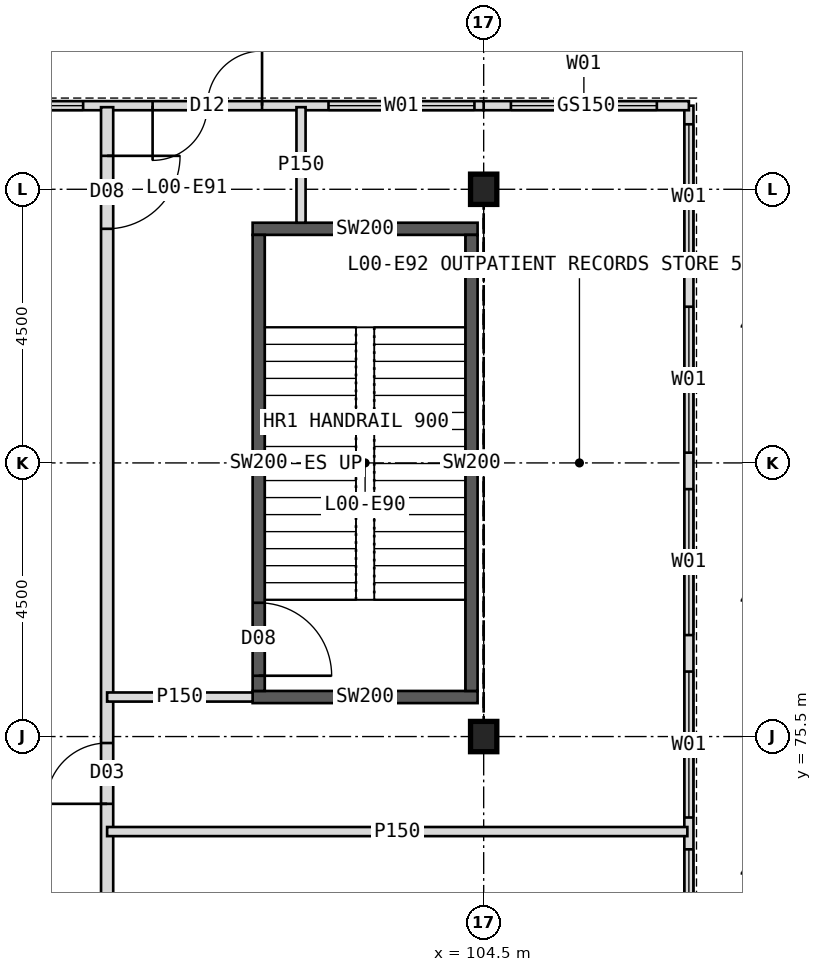
"""IFC4 building model, lengths in metres.
Left out: names, types, materials, properties, quantities, classifications, styles, units other than length and angle.
Written with IfcOpenShell. Run it as: python <this file> out.ifc"""

import sys

from ifc_helpers import new_model, si_unit, direction, frame, frame_2d, origin, origin_2d, place, context, subcontext, project, spatial, rectangle, i_section, extrude, element, fill, save


model = new_model("IFC4")
c1 = context("Model", 3, precision=1e-05, world=origin(), true_north=direction((0.0, 1.0)))
c2 = subcontext(c1, "Body", "Model", "MODEL_VIEW")
j1 = project(units=[si_unit("LENGTHUNIT", "METRE"), si_unit("PLANEANGLEUNIT", "RADIAN")], contexts=[c1])
p1 = place(None, origin())
s1 = spatial("IfcSite", under=j1, at=p1, CompositionType="ELEMENT")
p2 = place(p1, origin())
s2 = spatial("IfcBuilding", under=s1, at=p2, CompositionType="ELEMENT")
p3 = place(p2, origin())
s3 = spatial("IfcBuildingStorey", under=s2, at=p3, CompositionType="ELEMENT", Elevation=0.0)
for number, where, z_axis, x_axis in (
    (1, (104.5, 75.5, 0.0), (0.0, 0.0, 1.0), (1.0, 0.0, 0.0)),
    (2, (104.5, 84.5, 0.0), (0.0, 0.0, 1.0), (1.0, 0.0, 0.0)),
):
    element("IfcColumn", number, at=place(p3, frame(where, z_axis=z_axis, x_axis=x_axis)), inside=s3, PredefinedType="COLUMN", context=c2, shape_type="SweptSolid", body=[
        extrude(i_section(OverallWidth=0.432, OverallDepth=0.498, WebThickness=0.056, FlangeThickness=0.089, FilletRadius=0.015, at=origin_2d()), origin(), (0.0, 0.0, 1.0), 6.0),
    ])
p4 = place(p3, frame((107.875, 38.125, 0.0), z_axis=(0.0, 0.0, 1.0), x_axis=(0.0, 1.0, 0.0)))
e3 = element("IfcWall", 3, at=p4, inside=s3, PredefinedType="STANDARD", context=c2, shape_type="SweptSolid", body=[
    extrude(rectangle(XDim=47.75, YDim=0.15, at=frame_2d((23.875, 0.0))), origin(), (0.0, 0.0, 1.0), 6.0),
])
p5 = place(p4, frame((22.7, 0.0, 0.0)))
e4 = element("IfcOpeningElement", 4, at=p5, cuts=e3, PredefinedType="OPENING", context=c2, shape_type="SweptSolid", body=[
    extrude(rectangle(XDim=2.4, YDim=2.6, at=frame_2d((1.2, 1.3))), frame((0.0, 0.085, 0.0), z_axis=(0.0, -1.0, 0.0), x_axis=(1.0, 0.0, 0.0)), (0.0, 0.0, 1.0), 0.17),
])
p6 = place(p4, frame((0.33, 0.0, 0.6)))
e5 = element("IfcOpeningElement", 5, at=p6, cuts=e3, PredefinedType="OPENING", context=c2, shape_type="SweptSolid", body=[
    extrude(rectangle(XDim=2.4, YDim=3.0, at=frame_2d((1.2, 1.5))), frame((0.0, 0.085, 0.0), z_axis=(0.0, -1.0, 0.0), x_axis=(1.0, 0.0, 0.0)), (0.0, 0.0, 1.0), 0.17),
])
p7 = place(p4, frame((3.277, 0.0, 0.6)))
e6 = element("IfcOpeningElement", 6, at=p7, cuts=e3, PredefinedType="OPENING", context=c2, shape_type="SweptSolid", body=[
    extrude(rectangle(XDim=2.4, YDim=3.0, at=frame_2d((1.2, 1.5))), frame((0.0, 0.085, 0.0), z_axis=(0.0, -1.0, 0.0), x_axis=(1.0, 0.0, 0.0)), (0.0, 0.0, 1.0), 0.17),
])
p8 = place(p4, frame((6.261, 0.0, 0.6)))
e7 = element("IfcOpeningElement", 7, at=p8, cuts=e3, PredefinedType="OPENING", context=c2, shape_type="SweptSolid", body=[
    extrude(rectangle(XDim=2.4, YDim=3.0, at=frame_2d((1.2, 1.5))), frame((0.0, 0.085, 0.0), z_axis=(0.0, -1.0, 0.0), x_axis=(1.0, 0.0, 0.0)), (0.0, 0.0, 1.0), 0.17),
])
p9 = place(p4, frame((9.225, 0.0, 0.6)))
e8 = element("IfcOpeningElement", 8, at=p9, cuts=e3, PredefinedType="OPENING", context=c2, shape_type="SweptSolid", body=[
    extrude(rectangle(XDim=2.4, YDim=3.0, at=frame_2d((1.2, 1.5))), frame((0.0, 0.085, 0.0), z_axis=(0.0, -1.0, 0.0), x_axis=(1.0, 0.0, 0.0)), (0.0, 0.0, 1.0), 0.17),
])
p10 = place(p4, frame((12.225, 0.0, 0.6)))
e9 = element("IfcOpeningElement", 9, at=p10, cuts=e3, PredefinedType="OPENING", context=c2, shape_type="SweptSolid", body=[
    extrude(rectangle(XDim=2.4, YDim=3.0, at=frame_2d((1.2, 1.5))), frame((0.0, 0.085, 0.0), z_axis=(0.0, -1.0, 0.0), x_axis=(1.0, 0.0, 0.0)), (0.0, 0.0, 1.0), 0.17),
])
p11 = place(p4, frame((15.227, 0.0, 0.6)))
e10 = element("IfcOpeningElement", 10, at=p11, cuts=e3, PredefinedType="OPENING", context=c2, shape_type="SweptSolid", body=[
    extrude(rectangle(XDim=2.4, YDim=3.0, at=frame_2d((1.2, 1.5))), frame((0.0, 0.085, 0.0), z_axis=(0.0, -1.0, 0.0), x_axis=(1.0, 0.0, 0.0)), (0.0, 0.0, 1.0), 0.17),
])
p12 = place(p4, frame((18.198, 0.0, 0.6)))
e11 = element("IfcOpeningElement", 11, at=p12, cuts=e3, PredefinedType="OPENING", context=c2, shape_type="SweptSolid", body=[
    extrude(rectangle(XDim=2.4, YDim=3.0, at=frame_2d((1.2, 1.5))), frame((0.0, 0.085, 0.0), z_axis=(0.0, -1.0, 0.0), x_axis=(1.0, 0.0, 0.0)), (0.0, 0.0, 1.0), 0.17),
])
p13 = place(p4, frame((27.152, 0.0, 0.6)))
e12 = element("IfcOpeningElement", 12, at=p13, cuts=e3, PredefinedType="OPENING", context=c2, shape_type="SweptSolid", body=[
    extrude(rectangle(XDim=2.4, YDim=3.0, at=frame_2d((1.2, 1.5))), frame((0.0, 0.085, 0.0), z_axis=(0.0, -1.0, 0.0), x_axis=(1.0, 0.0, 0.0)), (0.0, 0.0, 1.0), 0.17),
])
p14 = place(p4, frame((30.136, 0.0, 0.6)))
e13 = element("IfcOpeningElement", 13, at=p14, cuts=e3, PredefinedType="OPENING", context=c2, shape_type="SweptSolid", body=[
    extrude(rectangle(XDim=2.4, YDim=3.0, at=frame_2d((1.2, 1.5))), frame((0.0, 0.085, 0.0), z_axis=(0.0, -1.0, 0.0), x_axis=(1.0, 0.0, 0.0)), (0.0, 0.0, 1.0), 0.17),
])
p15 = place(p4, frame((33.12, 0.0, 0.6)))
e14 = element("IfcOpeningElement", 14, at=p15, cuts=e3, PredefinedType="OPENING", context=c2, shape_type="SweptSolid", body=[
    extrude(rectangle(XDim=2.4, YDim=3.0, at=frame_2d((1.2, 1.5))), frame((0.0, 0.085, 0.0), z_axis=(0.0, -1.0, 0.0), x_axis=(1.0, 0.0, 0.0)), (0.0, 0.0, 1.0), 0.17),
])
p16 = place(p4, frame((36.044, 0.0, 0.6)))
e15 = element("IfcOpeningElement", 15, at=p16, cuts=e3, PredefinedType="OPENING", context=c2, shape_type="SweptSolid", body=[
    extrude(rectangle(XDim=2.4, YDim=3.0, at=frame_2d((1.2, 1.5))), frame((0.0, 0.085, 0.0), z_axis=(0.0, -1.0, 0.0), x_axis=(1.0, 0.0, 0.0)), (0.0, 0.0, 1.0), 0.17),
])
p17 = place(p4, frame((39.044, 0.0, 0.6)))
e16 = element("IfcOpeningElement", 16, at=p17, cuts=e3, PredefinedType="OPENING", context=c2, shape_type="SweptSolid", body=[
    extrude(rectangle(XDim=2.4, YDim=3.0, at=frame_2d((1.2, 1.5))), frame((0.0, 0.085, 0.0), z_axis=(0.0, -1.0, 0.0), x_axis=(1.0, 0.0, 0.0)), (0.0, 0.0, 1.0), 0.17),
])
p18 = place(p4, frame((42.044, 0.0, 0.6)))
e17 = element("IfcOpeningElement", 17, at=p18, cuts=e3, PredefinedType="OPENING", context=c2, shape_type="SweptSolid", body=[
    extrude(rectangle(XDim=2.4, YDim=3.0, at=frame_2d((1.2, 1.5))), frame((0.0, 0.085, 0.0), z_axis=(0.0, -1.0, 0.0), x_axis=(1.0, 0.0, 0.0)), (0.0, 0.0, 1.0), 0.17),
])
p19 = place(p4, frame((45.044, 0.0, 0.6)))
e18 = element("IfcOpeningElement", 18, at=p19, cuts=e3, PredefinedType="OPENING", context=c2, shape_type="SweptSolid", body=[
    extrude(rectangle(XDim=2.4, YDim=3.0, at=frame_2d((1.2, 1.5))), frame((0.0, 0.085, 0.0), z_axis=(0.0, -1.0, 0.0), x_axis=(1.0, 0.0, 0.0)), (0.0, 0.0, 1.0), 0.17),
])
p20 = place(p3, frame((107.875, 85.875, 0.0), z_axis=(0.0, 0.0, 1.0), x_axis=(-1.0, 0.0, 0.0)))
e19 = element("IfcWall", 19, at=p20, inside=s3, PredefinedType="STANDARD", context=c2, shape_type="SweptSolid", body=[
    extrude(rectangle(XDim=3.375, YDim=0.15, at=frame_2d((1.688, 0.0))), origin(), (0.0, 0.0, 1.0), 6.0),
])
p21 = place(p20, frame((0.527, 0.0, 0.6)))
e20 = element("IfcOpeningElement", 20, at=p21, cuts=e19, PredefinedType="OPENING", context=c2, shape_type="SweptSolid", body=[
    extrude(rectangle(XDim=2.4, YDim=3.0, at=frame_2d((1.2, 1.5))), frame((0.0, 0.085, 0.0), z_axis=(0.0, -1.0, 0.0), x_axis=(1.0, 0.0, 0.0)), (0.0, 0.0, 1.0), 0.17),
])
p22 = place(p3, frame((104.5, 85.875, 0.0), z_axis=(0.0, 0.0, 1.0), x_axis=(-1.0, 0.0, 0.0)))
e21 = element("IfcWall", 21, at=p22, inside=s3, PredefinedType="STANDARD", context=c2, shape_type="SweptSolid", body=[
    extrude(rectangle(XDim=18.341, YDim=0.15, at=frame_2d((9.17, 0.0))), origin(), (0.0, 0.0, 1.0), 5.1),
])
p23 = place(p22, frame((3.645, 0.0, 0.0)))
e22 = element("IfcOpeningElement", 22, at=p23, cuts=e21, PredefinedType="OPENING", context=c2, shape_type="SweptSolid", body=[
    extrude(rectangle(XDim=1.8, YDim=2.4, at=frame_2d((0.9, 1.2))), frame((0.0, 0.085, 0.0), z_axis=(0.0, -1.0, 0.0), x_axis=(1.0, 0.0, 0.0)), (0.0, 0.0, 1.0), 0.17),
])
p24 = place(p22, frame((0.152, 0.0, 0.6)))
e23 = element("IfcOpeningElement", 23, at=p24, cuts=e21, PredefinedType="OPENING", context=c2, shape_type="SweptSolid", body=[
    extrude(rectangle(XDim=2.4, YDim=3.0, at=frame_2d((1.2, 1.5))), frame((0.0, 0.085, 0.0), z_axis=(0.0, -1.0, 0.0), x_axis=(1.0, 0.0, 0.0)), (0.0, 0.0, 1.0), 0.17),
])
p25 = place(p22, frame((6.587, 0.0, 0.6)))
e24 = element("IfcOpeningElement", 24, at=p25, cuts=e21, PredefinedType="OPENING", context=c2, shape_type="SweptSolid", body=[
    extrude(rectangle(XDim=2.4, YDim=3.0, at=frame_2d((1.2, 1.5))), frame((0.0, 0.085, 0.0), z_axis=(0.0, -1.0, 0.0), x_axis=(1.0, 0.0, 0.0)), (0.0, 0.0, 1.0), 0.17),
])
p26 = place(p22, frame((9.941, 0.0, 0.6)))
e25 = element("IfcOpeningElement", 25, at=p26, cuts=e21, PredefinedType="OPENING", context=c2, shape_type="SweptSolid", body=[
    extrude(rectangle(XDim=2.4, YDim=3.0, at=frame_2d((1.2, 1.5))), frame((0.0, 0.085, 0.0), z_axis=(0.0, -1.0, 0.0), x_axis=(1.0, 0.0, 0.0)), (0.0, 0.0, 1.0), 0.17),
])
p27 = place(p22, frame((12.941, 0.0, 0.6)))
e26 = element("IfcOpeningElement", 26, at=p27, cuts=e21, PredefinedType="OPENING", context=c2, shape_type="SweptSolid", body=[
    extrude(rectangle(XDim=2.4, YDim=3.0, at=frame_2d((1.2, 1.5))), frame((0.0, 0.085, 0.0), z_axis=(0.0, -1.0, 0.0), x_axis=(1.0, 0.0, 0.0)), (0.0, 0.0, 1.0), 0.17),
])
p28 = place(p22, frame((15.941, 0.0, 0.6)))
e27 = element("IfcOpeningElement", 27, at=p28, cuts=e21, PredefinedType="OPENING", context=c2, shape_type="SweptSolid", body=[
    extrude(rectangle(XDim=2.4, YDim=3.0, at=frame_2d((1.2, 1.5))), frame((0.0, 0.085, 0.0), z_axis=(0.0, -1.0, 0.0), x_axis=(1.0, 0.0, 0.0)), (0.0, 0.0, 1.0), 0.17),
])
p29 = place(p3, frame((98.307, 38.15, 0.0), z_axis=(0.0, 0.0, 1.0), x_axis=(0.0, 1.0, 0.0)))
e28 = element("IfcWall", 28, at=p29, inside=s3, PredefinedType="PARTITIONING", context=c2, shape_type="SweptSolid", body=[
    extrude(rectangle(XDim=47.7, YDim=0.2, at=frame_2d((23.85, 0.0))), origin(), (0.0, 0.0, 1.0), 5.7),
])
p30 = place(p29, frame((45.7, 0.0, 0.0)))
e29 = element("IfcOpeningElement", 29, at=p30, cuts=e28, PredefinedType="OPENING", context=c2, shape_type="SweptSolid", body=[
    extrude(rectangle(XDim=1.2, YDim=2.1, at=frame_2d((0.6, 1.05))), frame((0.0, 0.11, 0.0), z_axis=(0.0, -1.0, 0.0), x_axis=(1.0, 0.0, 0.0)), (0.0, 0.0, 1.0), 0.22),
])
p31 = place(p29, frame((36.244, 0.0, 0.0)))
e30 = element("IfcOpeningElement", 30, at=p31, cuts=e28, PredefinedType="OPENING", context=c2, shape_type="SweptSolid", body=[
    extrude(rectangle(XDim=1.0, YDim=2.1, at=frame_2d((0.5, 1.05))), frame((0.0, 0.11, 0.0), z_axis=(0.0, -1.0, 0.0), x_axis=(1.0, 0.0, 0.0)), (0.0, 0.0, 1.0), 0.22),
])
p32 = place(p29, frame((0.93, 0.0, 0.0)))
e31 = element("IfcOpeningElement", 31, at=p32, cuts=e28, PredefinedType="OPENING", context=c2, shape_type="SweptSolid", body=[
    extrude(rectangle(XDim=1.0, YDim=2.1, at=frame_2d((0.5, 1.05))), frame((0.0, 0.11, 0.0), z_axis=(0.0, -1.0, 0.0), x_axis=(1.0, 0.0, 0.0)), (0.0, 0.0, 1.0), 0.22),
])
p33 = place(p29, frame((3.852, 0.0, 0.0)))
e32 = element("IfcOpeningElement", 32, at=p33, cuts=e28, PredefinedType="OPENING", context=c2, shape_type="SweptSolid", body=[
    extrude(rectangle(XDim=1.0, YDim=2.1, at=frame_2d((0.5, 1.05))), frame((0.0, 0.11, 0.0), z_axis=(0.0, -1.0, 0.0), x_axis=(1.0, 0.0, 0.0)), (0.0, 0.0, 1.0), 0.22),
])
p34 = place(p29, frame((6.836, 0.0, 0.0)))
e33 = element("IfcOpeningElement", 33, at=p34, cuts=e28, PredefinedType="OPENING", context=c2, shape_type="SweptSolid", body=[
    extrude(rectangle(XDim=1.0, YDim=2.1, at=frame_2d((0.5, 1.05))), frame((0.0, 0.11, 0.0), z_axis=(0.0, -1.0, 0.0), x_axis=(1.0, 0.0, 0.0)), (0.0, 0.0, 1.0), 0.22),
])
p35 = place(p29, frame((11.012, 0.0, 0.0)))
e34 = element("IfcOpeningElement", 34, at=p35, cuts=e28, PredefinedType="OPENING", context=c2, shape_type="SweptSolid", body=[
    extrude(rectangle(XDim=1.6, YDim=2.2, at=frame_2d((0.8, 1.1))), frame((0.0, 0.11, 0.0), z_axis=(0.0, -1.0, 0.0), x_axis=(1.0, 0.0, 0.0)), (0.0, 0.0, 1.0), 0.22),
])
p36 = place(p29, frame((15.789, 0.0, 0.0)))
e35 = element("IfcOpeningElement", 35, at=p36, cuts=e28, PredefinedType="OPENING", context=c2, shape_type="SweptSolid", body=[
    extrude(rectangle(XDim=1.0, YDim=2.1, at=frame_2d((0.5, 1.05))), frame((0.0, 0.11, 0.0), z_axis=(0.0, -1.0, 0.0), x_axis=(1.0, 0.0, 0.0)), (0.0, 0.0, 1.0), 0.22),
])
p37 = place(p29, frame((18.773, 0.0, 0.0)))
e36 = element("IfcOpeningElement", 36, at=p37, cuts=e28, PredefinedType="OPENING", context=c2, shape_type="SweptSolid", body=[
    extrude(rectangle(XDim=1.0, YDim=2.1, at=frame_2d((0.5, 1.05))), frame((0.0, 0.11, 0.0), z_axis=(0.0, -1.0, 0.0), x_axis=(1.0, 0.0, 0.0)), (0.0, 0.0, 1.0), 0.22),
])
p38 = place(p29, frame((22.95, 0.0, 0.0)))
e37 = element("IfcOpeningElement", 37, at=p38, cuts=e28, PredefinedType="OPENING", context=c2, shape_type="SweptSolid", body=[
    extrude(rectangle(XDim=1.6, YDim=2.2, at=frame_2d((0.8, 1.1))), frame((0.0, 0.11, 0.0), z_axis=(0.0, -1.0, 0.0), x_axis=(1.0, 0.0, 0.0)), (0.0, 0.0, 1.0), 0.22),
])
p39 = place(p29, frame((27.727, 0.0, 0.0)))
e38 = element("IfcOpeningElement", 38, at=p39, cuts=e28, PredefinedType="OPENING", context=c2, shape_type="SweptSolid", body=[
    extrude(rectangle(XDim=1.0, YDim=2.1, at=frame_2d((0.5, 1.05))), frame((0.0, 0.11, 0.0), z_axis=(0.0, -1.0, 0.0), x_axis=(1.0, 0.0, 0.0)), (0.0, 0.0, 1.0), 0.22),
])
p40 = place(p29, frame((30.711, 0.0, 0.0)))
e39 = element("IfcOpeningElement", 39, at=p40, cuts=e28, PredefinedType="OPENING", context=c2, shape_type="SweptSolid", body=[
    extrude(rectangle(XDim=1.0, YDim=2.1, at=frame_2d((0.5, 1.05))), frame((0.0, 0.11, 0.0), z_axis=(0.0, -1.0, 0.0), x_axis=(1.0, 0.0, 0.0)), (0.0, 0.0, 1.0), 0.22),
])
p41 = place(p29, frame((33.695, 0.0, 0.0)))
e40 = element("IfcOpeningElement", 40, at=p41, cuts=e28, PredefinedType="OPENING", context=c2, shape_type="SweptSolid", body=[
    extrude(rectangle(XDim=1.0, YDim=2.1, at=frame_2d((0.5, 1.05))), frame((0.0, 0.11, 0.0), z_axis=(0.0, -1.0, 0.0), x_axis=(1.0, 0.0, 0.0)), (0.0, 0.0, 1.0), 0.22),
])
for number, where, z_axis, x_axis in (
    (41, (100.7, 76.15, 0.0), (0.0, 0.0, 1.0), (1.0, 0.0, 0.0)),
    (42, (100.7, 83.85, 0.0), (0.0, 0.0, 1.0), (1.0, 0.0, 0.0)),
):
    element("IfcWall", number, at=place(p3, frame(where, z_axis=z_axis, x_axis=x_axis)), inside=s3, PredefinedType="SOLIDWALL", context=c2, shape_type="SweptSolid", body=[
        extrude(rectangle(XDim=3.7, YDim=0.2, at=frame_2d((1.85, 0.0))), origin(), (0.0, 0.0, 1.0), 5.7),
    ])
p42 = place(p3, frame((100.8, 76.25, 0.0), z_axis=(0.0, 0.0, 1.0), x_axis=(0.0, 1.0, 0.0)))
e43 = element("IfcWall", 43, at=p42, inside=s3, PredefinedType="SOLIDWALL", context=c2, shape_type="SweptSolid", body=[
    extrude(rectangle(XDim=7.5, YDim=0.2, at=frame_2d((3.75, 0.0))), origin(), (0.0, 0.0, 1.0), 5.7),
])
p43 = place(p42, frame((0.25, 0.0, 0.0)))
e44 = element("IfcOpeningElement", 44, at=p43, cuts=e43, PredefinedType="OPENING", context=c2, shape_type="SweptSolid", body=[
    extrude(rectangle(XDim=1.2, YDim=2.1, at=frame_2d((0.6, 1.05))), frame((0.0, 0.11, 0.0), z_axis=(0.0, -1.0, 0.0), x_axis=(1.0, 0.0, 0.0)), (0.0, 0.0, 1.0), 0.22),
])
p44 = place(p3, frame((104.3, 76.25, 0.0), z_axis=(0.0, 0.0, 1.0), x_axis=(0.0, 1.0, 0.0)))
e45 = element("IfcWall", 45, at=p44, inside=s3, PredefinedType="SOLIDWALL", context=c2, shape_type="SweptSolid", body=[
    extrude(rectangle(XDim=7.5, YDim=0.2, at=frame_2d((3.75, 0.0))), origin(), (0.0, 0.0, 1.0), 5.7),
])
p45 = place(p3, frame((100.7, 76.15, 0.0), z_axis=(0.0, 0.0, 1.0), x_axis=(-1.0, 0.0, 0.0)))
e46 = element("IfcWall", 46, at=p45, inside=s3, PredefinedType="PARTITIONING", context=c2, shape_type="SweptSolid", body=[
    extrude(rectangle(XDim=2.393, YDim=0.15, at=frame_2d((1.197, 0.0))), origin(), (0.0, 0.0, 1.0), 5.7),
])
p46 = place(p3, frame((101.496, 83.95, 0.0), z_axis=(0.0, 0.0, 1.0), x_axis=(0.0, 1.0, 0.0)))
e47 = element("IfcWall", 47, at=p46, inside=s3, PredefinedType="PARTITIONING", context=c2, shape_type="SweptSolid", body=[
    extrude(rectangle(XDim=1.9, YDim=0.15, at=frame_2d((0.95, 0.0))), origin(), (0.0, 0.0, 1.0), 5.7),
])
p47 = place(p3, frame((107.85, 73.938, 0.0), z_axis=(0.0, 0.0, 1.0), x_axis=(-1.0, 0.0, 0.0)))
e48 = element("IfcWall", 48, at=p47, inside=s3, PredefinedType="PARTITIONING", context=c2, shape_type="SweptSolid", body=[
    extrude(rectangle(XDim=9.543, YDim=0.15, at=frame_2d((4.771, 0.0))), origin(), (0.0, 0.0, 1.0), 5.7),
])
p48 = place(p15, origin())
e49 = element("IfcWindow", 49, at=p48, inside=s3, PartitioningType="SINGLE_PANEL", PredefinedType="WINDOW", context=c2, shape_type="SweptSolid", body=[
    extrude(rectangle(XDim=2.4, YDim=3.0, at=frame_2d((1.2, 1.5))), frame((0.0, 0.03, 0.0), z_axis=(0.0, -1.0, 0.0), x_axis=(1.0, 0.0, 0.0)), (0.0, 0.0, 1.0), 0.06),
])
fill(e14, e49)
p49 = place(p16, origin())
e50 = element("IfcWindow", 50, at=p49, inside=s3, PartitioningType="SINGLE_PANEL", PredefinedType="WINDOW", context=c2, shape_type="SweptSolid", body=[
    extrude(rectangle(XDim=2.4, YDim=3.0, at=frame_2d((1.2, 1.5))), frame((0.0, 0.03, 0.0), z_axis=(0.0, -1.0, 0.0), x_axis=(1.0, 0.0, 0.0)), (0.0, 0.0, 1.0), 0.06),
])
fill(e15, e50)
p50 = place(p17, origin())
e51 = element("IfcWindow", 51, at=p50, inside=s3, PartitioningType="SINGLE_PANEL", PredefinedType="WINDOW", context=c2, shape_type="SweptSolid", body=[
    extrude(rectangle(XDim=2.4, YDim=3.0, at=frame_2d((1.2, 1.5))), frame((0.0, 0.03, 0.0), z_axis=(0.0, -1.0, 0.0), x_axis=(1.0, 0.0, 0.0)), (0.0, 0.0, 1.0), 0.06),
])
fill(e16, e51)
p51 = place(p18, origin())
e52 = element("IfcWindow", 52, at=p51, inside=s3, PartitioningType="SINGLE_PANEL", PredefinedType="WINDOW", context=c2, shape_type="SweptSolid", body=[
    extrude(rectangle(XDim=2.4, YDim=3.0, at=frame_2d((1.2, 1.5))), frame((0.0, 0.03, 0.0), z_axis=(0.0, -1.0, 0.0), x_axis=(1.0, 0.0, 0.0)), (0.0, 0.0, 1.0), 0.06),
])
fill(e17, e52)
p52 = place(p19, origin())
e53 = element("IfcWindow", 53, at=p52, inside=s3, PartitioningType="SINGLE_PANEL", PredefinedType="WINDOW", context=c2, shape_type="SweptSolid", body=[
    extrude(rectangle(XDim=2.4, YDim=3.0, at=frame_2d((1.2, 1.5))), frame((0.0, 0.03, 0.0), z_axis=(0.0, -1.0, 0.0), x_axis=(1.0, 0.0, 0.0)), (0.0, 0.0, 1.0), 0.06),
])
fill(e18, e53)
p53 = place(p23, frame((1.8, 0.0, 0.0), z_axis=(0.0, 0.0, 1.0), x_axis=(-1.0, 0.0, 0.0)))
e54 = element("IfcDoor", 54, at=p53, inside=s3, OperationType="DOUBLE_DOOR_SINGLE_SWING", PredefinedType="DOOR", context=c2, shape_type="SweptSolid", body=[
    extrude(rectangle(XDim=1.8, YDim=2.4, at=frame_2d((0.9, 1.2))), frame((0.0, 0.025, 0.0), z_axis=(0.0, -1.0, 0.0), x_axis=(1.0, 0.0, 0.0)), (0.0, 0.0, 1.0), 0.05),
])
fill(e22, e54)
p54 = place(p21, origin())
e55 = element("IfcWindow", 55, at=p54, inside=s3, PartitioningType="SINGLE_PANEL", PredefinedType="WINDOW", context=c2, shape_type="SweptSolid", body=[
    extrude(rectangle(XDim=2.4, YDim=3.0, at=frame_2d((1.2, 1.5))), frame((0.0, 0.03, 0.0), z_axis=(0.0, -1.0, 0.0), x_axis=(1.0, 0.0, 0.0)), (0.0, 0.0, 1.0), 0.06),
])
fill(e20, e55)
p55 = place(p24, origin())
e56 = element("IfcWindow", 56, at=p55, inside=s3, PartitioningType="SINGLE_PANEL", PredefinedType="WINDOW", context=c2, shape_type="SweptSolid", body=[
    extrude(rectangle(XDim=2.4, YDim=3.0, at=frame_2d((1.2, 1.5))), frame((0.0, 0.03, 0.0), z_axis=(0.0, -1.0, 0.0), x_axis=(1.0, 0.0, 0.0)), (0.0, 0.0, 1.0), 0.06),
])
fill(e23, e56)
p56 = place(p25, origin())
e57 = element("IfcWindow", 57, at=p56, inside=s3, PartitioningType="SINGLE_PANEL", PredefinedType="WINDOW", context=c2, shape_type="SweptSolid", body=[
    extrude(rectangle(XDim=2.4, YDim=3.0, at=frame_2d((1.2, 1.5))), frame((0.0, 0.03, 0.0), z_axis=(0.0, -1.0, 0.0), x_axis=(1.0, 0.0, 0.0)), (0.0, 0.0, 1.0), 0.06),
])
fill(e24, e57)
p57 = place(p43, frame((1.2, 0.0, 0.0), z_axis=(0.0, 0.0, 1.0), x_axis=(-1.0, 0.0, 0.0)))
e58 = element("IfcDoor", 58, at=p57, inside=s3, OperationType="SINGLE_SWING_RIGHT", PredefinedType="DOOR", context=c2, shape_type="SweptSolid", body=[
    extrude(rectangle(XDim=1.2, YDim=2.1, at=frame_2d((0.6, 1.05))), frame((0.0, 0.025, 0.0), z_axis=(0.0, -1.0, 0.0), x_axis=(1.0, 0.0, 0.0)), (0.0, 0.0, 1.0), 0.05),
])
fill(e44, e58)
p58 = place(p30, frame((1.2, 0.0, 0.0), z_axis=(0.0, 0.0, 1.0), x_axis=(-1.0, 0.0, 0.0)))
e59 = element("IfcDoor", 59, at=p58, inside=s3, OperationType="SINGLE_SWING_LEFT", PredefinedType="DOOR", context=c2, shape_type="SweptSolid", body=[
    extrude(rectangle(XDim=1.2, YDim=2.1, at=frame_2d((0.6, 1.05))), frame((0.0, 0.025, 0.0), z_axis=(0.0, -1.0, 0.0), x_axis=(1.0, 0.0, 0.0)), (0.0, 0.0, 1.0), 0.05),
])
fill(e29, e59)
p59 = place(p31, origin())
e60 = element("IfcDoor", 60, at=p59, inside=s3, OperationType="SINGLE_SWING_LEFT", PredefinedType="DOOR", context=c2, shape_type="SweptSolid", body=[
    extrude(rectangle(XDim=1.0, YDim=2.1, at=frame_2d((0.5, 1.05))), frame((0.0, 0.025, 0.0), z_axis=(0.0, -1.0, 0.0), x_axis=(1.0, 0.0, 0.0)), (0.0, 0.0, 1.0), 0.05),
])
fill(e30, e60)
save(model, sys.argv[1])
